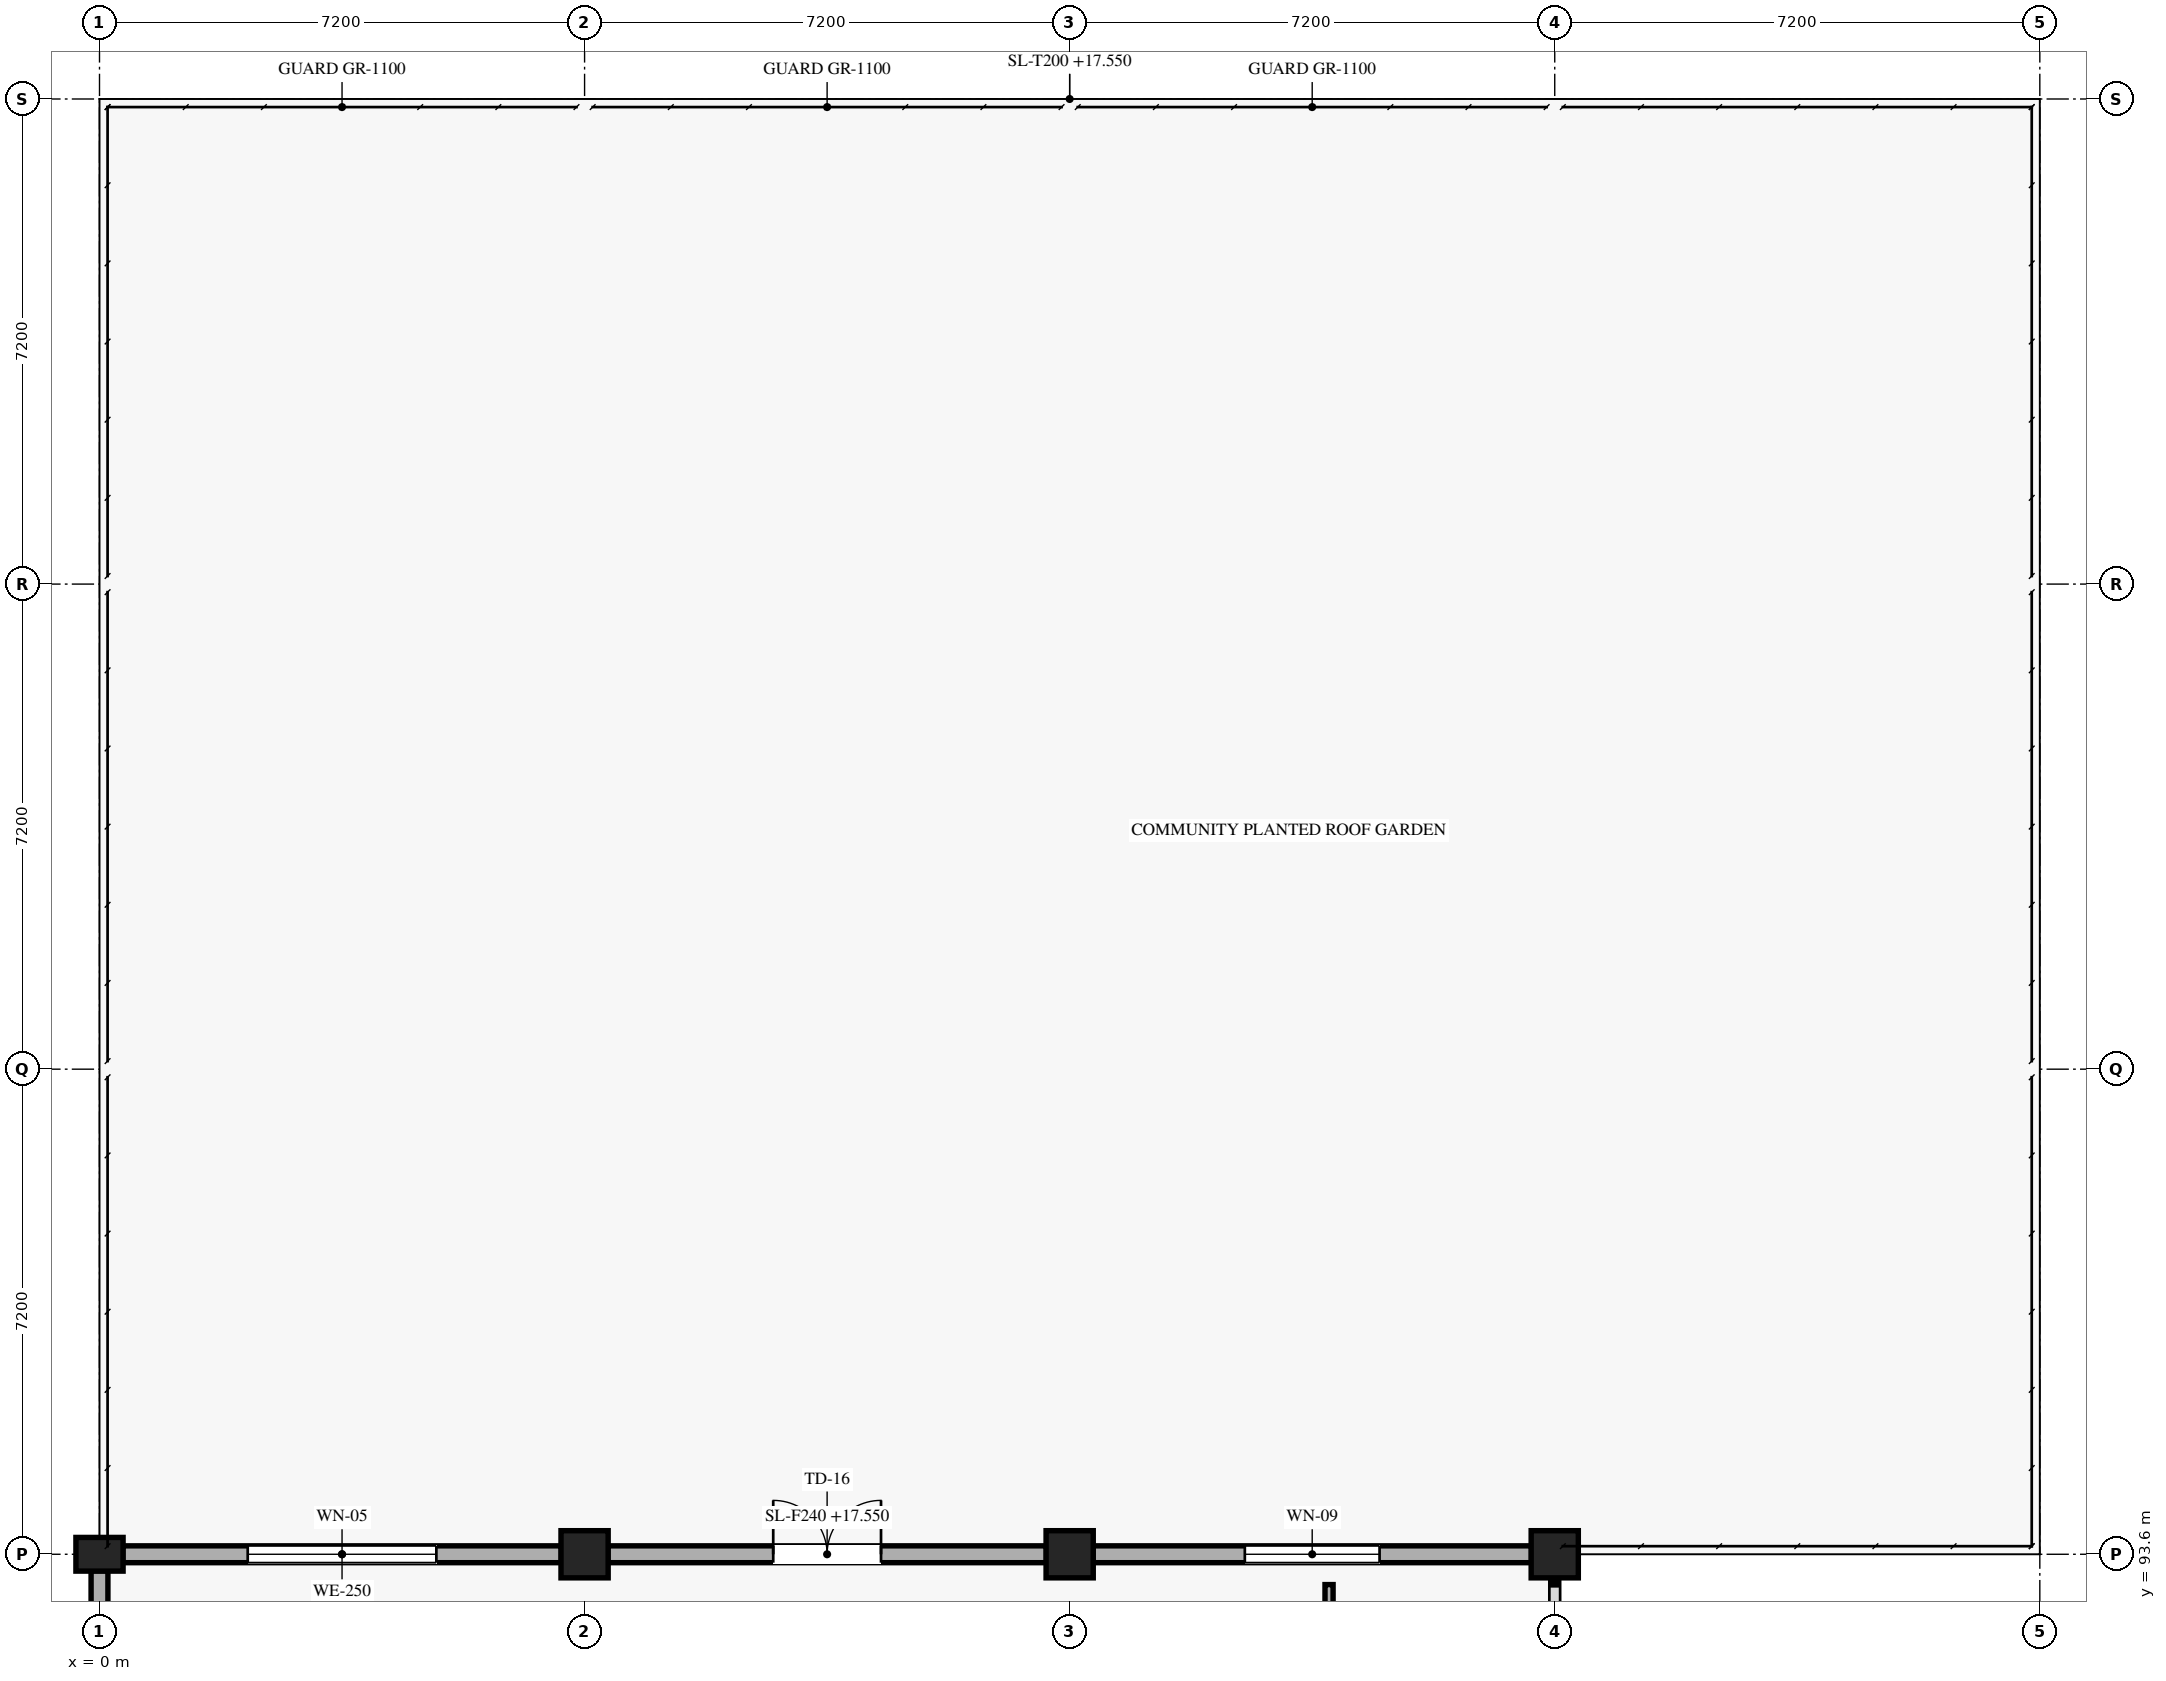
"""IFC4 building model, lengths in metres.
Left out: names, types, materials, properties, quantities, classifications, styles, units other than length and angle.
Written with IfcOpenShell. Run it as: python <this file> out.ifc"""

import sys

from ifc_helpers import new_model, si_unit, direction, frame, frame_2d, origin, origin_2d, place, context, subcontext, project, spatial, rectangle, extrude, element, fill, save


model = new_model("IFC4")
c1 = context("Model", 3, precision=1e-05, world=origin(), true_north=direction((0.0, 1.0)))
c2 = subcontext(c1, "Body", "Model", "MODEL_VIEW")
j1 = project(units=[si_unit("LENGTHUNIT", "METRE"), si_unit("PLANEANGLEUNIT", "RADIAN")], contexts=[c1])
p1 = place(None, origin())
s1 = spatial("IfcSite", under=j1, at=p1, CompositionType="ELEMENT")
p2 = place(p1, origin())
s2 = spatial("IfcBuilding", under=s1, at=p2, CompositionType="ELEMENT")
p3 = place(p2, frame((0.0, 0.0, 17.55)))
s3 = spatial("IfcBuildingStorey", under=s2, at=p3, CompositionType="ELEMENT", Elevation=17.55)
p4 = place(p3, frame((0.0, 93.6, 0.0), z_axis=(0.0, 0.0, 1.0), x_axis=(0.0, 1.0, 0.0)))
e1 = element("IfcColumn", 1, at=p4, inside=s3, PredefinedType="COLUMN", context=c2, shape_type="SweptSolid", body=[
    extrude(rectangle(XDim=0.5, YDim=0.7, at=origin_2d()), origin(), (0.0, 0.0, 1.0), 4.05),
])
for number, where, z_axis, x_axis in (
    (2, (7.2, 93.6, 0.0), (0.0, 0.0, 1.0), (1.0, 0.0, 0.0)),
    (3, (14.4, 93.6, 0.0), (0.0, 0.0, 1.0), (1.0, 0.0, 0.0)),
    (4, (21.6, 93.6, 0.0), (0.0, 0.0, 1.0), (1.0, 0.0, 0.0)),
):
    element("IfcColumn", number, at=place(p3, frame(where, z_axis=z_axis, x_axis=x_axis)), inside=s3, PredefinedType="COLUMN", context=c2, shape_type="SweptSolid", body=[
        extrude(rectangle(XDim=0.7, YDim=0.7, at=origin_2d()), origin(), (0.0, 0.0, 1.0), 4.05),
    ])
p5 = place(p3, frame((0.345, 93.6, 0.0), z_axis=(0.0, 0.0, 1.0), x_axis=(1.0, 0.0, 0.0)))
e5 = element("IfcWall", 5, at=p5, inside=s3, PredefinedType="SOLIDWALL", context=c2, shape_type="SweptSolid", body=[
    extrude(rectangle(XDim=6.51, YDim=0.25, at=frame_2d((3.255, 0.0))), origin(), (0.0, 0.0, 1.0), 3.295),
])
p6 = place(p5, frame((1.855, 0.0, 0.85)))
e6 = element("IfcOpeningElement", 6, at=p6, cuts=e5, PredefinedType="OPENING", context=c2, shape_type="SweptSolid", body=[
    extrude(rectangle(XDim=2.8, YDim=1.85, at=frame_2d((1.4, 0.925))), frame((0.0, 0.135, 0.0), z_axis=(0.0, -1.0, 0.0), x_axis=(1.0, 0.0, 0.0)), (0.0, 0.0, 1.0), 0.27),
])
p7 = place(p3, frame((7.545, 93.6, 0.0), z_axis=(0.0, 0.0, 1.0), x_axis=(1.0, 0.0, 0.0)))
e7 = element("IfcWall", 7, at=p7, inside=s3, PredefinedType="SOLIDWALL", context=c2, shape_type="SweptSolid", body=[
    extrude(rectangle(XDim=6.51, YDim=0.25, at=frame_2d((3.255, 0.0))), origin(), (0.0, 0.0, 1.0), 3.295),
])
p8 = place(p7, frame((2.455, 0.0, 0.0)))
e8 = element("IfcOpeningElement", 8, at=p8, cuts=e7, PredefinedType="OPENING", context=c2, shape_type="SweptSolid", body=[
    extrude(rectangle(XDim=1.6, YDim=2.2, at=frame_2d((0.8, 1.1))), frame((0.0, 0.135, 0.0), z_axis=(0.0, -1.0, 0.0), x_axis=(1.0, 0.0, 0.0)), (0.0, 0.0, 1.0), 0.27),
])
p9 = place(p3, frame((14.745, 93.6, 0.0), z_axis=(0.0, 0.0, 1.0), x_axis=(1.0, 0.0, 0.0)))
e9 = element("IfcWall", 9, at=p9, inside=s3, PredefinedType="SOLIDWALL", context=c2, shape_type="SweptSolid", body=[
    extrude(rectangle(XDim=6.51, YDim=0.25, at=frame_2d((3.255, 0.0))), origin(), (0.0, 0.0, 1.0), 3.295),
])
p10 = place(p9, frame((2.255, 0.0, 0.85)))
e10 = element("IfcOpeningElement", 10, at=p10, cuts=e9, PredefinedType="OPENING", context=c2, shape_type="SweptSolid", body=[
    extrude(rectangle(XDim=2.0, YDim=1.65, at=frame_2d((1.0, 0.825))), frame((0.0, 0.135, 0.0), z_axis=(0.0, -1.0, 0.0), x_axis=(1.0, 0.0, 0.0)), (0.0, 0.0, 1.0), 0.27),
])
p11 = place(p3, frame((0.0, 86.645, 0.0), z_axis=(0.0, 0.0, 1.0), x_axis=(0.0, 1.0, 0.0)))
e11 = element("IfcWall", 11, at=p11, inside=s3, PredefinedType="SOLIDWALL", context=c2, shape_type="SweptSolid", body=[
    extrude(rectangle(XDim=6.71, YDim=0.25, at=frame_2d((3.355, 0.0))), origin(), (0.0, 0.0, 1.0), 3.295),
])
p12 = place(p11, frame((1.855, 0.0, 0.85)))
e12 = element("IfcOpeningElement", 12, at=p12, cuts=e11, PredefinedType="OPENING", context=c2, shape_type="SweptSolid", body=[
    extrude(rectangle(XDim=3.0, YDim=1.9, at=frame_2d((1.5, 0.95))), frame((0.0, 0.135, 0.0), z_axis=(0.0, -1.0, 0.0), x_axis=(1.0, 0.0, 0.0)), (0.0, 0.0, 1.0), 0.27),
])
p13 = place(p3, frame((18.25, 72.6, 0.0), z_axis=(0.0, 0.0, 1.0), x_axis=(0.0, 1.0, 0.0)))
e13 = element("IfcWall", 13, at=p13, inside=s3, PredefinedType="PARTITIONING", context=c2, shape_type="SweptSolid", body=[
    extrude(rectangle(XDim=20.55, YDim=0.12, at=frame_2d((10.275, 0.0))), origin(), (0.0, 0.0, 1.0), 3.83),
])
p14 = place(p13, frame((16.794, 0.0, 0.0)))
e14 = element("IfcOpeningElement", 14, at=p14, cuts=e13, PredefinedType="OPENING", context=c2, shape_type="SweptSolid", body=[
    extrude(rectangle(XDim=1.25, YDim=2.2, at=frame_2d((0.625, 1.1))), frame((0.0, 0.07, 0.0), z_axis=(0.0, -1.0, 0.0), x_axis=(1.0, 0.0, 0.0)), (0.0, 0.0, 1.0), 0.14),
])
p15 = place(p6, origin())
e15 = element("IfcWindow", 15, at=p15, inside=s3, PartitioningType="SINGLE_PANEL", PredefinedType="WINDOW", context=c2, shape_type="SweptSolid", body=[
    extrude(rectangle(XDim=2.8, YDim=1.85, at=frame_2d((1.4, 0.925))), frame((0.0, 0.03, 0.0), z_axis=(0.0, -1.0, 0.0), x_axis=(1.0, 0.0, 0.0)), (0.0, 0.0, 1.0), 0.06),
])
fill(e6, e15)
p16 = place(p8, origin())
e16 = element("IfcDoor", 16, at=p16, inside=s3, OperationType="DOUBLE_DOOR_SINGLE_SWING", PredefinedType="DOOR", context=c2, shape_type="SweptSolid", body=[
    extrude(rectangle(XDim=1.6, YDim=2.2, at=frame_2d((0.8, 1.1))), frame((0.0, 0.025, 0.0), z_axis=(0.0, -1.0, 0.0), x_axis=(1.0, 0.0, 0.0)), (0.0, 0.0, 1.0), 0.05),
])
fill(e8, e16)
p17 = place(p10, origin())
e17 = element("IfcWindow", 17, at=p17, inside=s3, PartitioningType="SINGLE_PANEL", PredefinedType="WINDOW", context=c2, shape_type="SweptSolid", body=[
    extrude(rectangle(XDim=2.0, YDim=1.65, at=frame_2d((1.0, 0.825))), frame((0.0, 0.03, 0.0), z_axis=(0.0, -1.0, 0.0), x_axis=(1.0, 0.0, 0.0)), (0.0, 0.0, 1.0), 0.06),
])
fill(e10, e17)
save(model, sys.argv[1])
